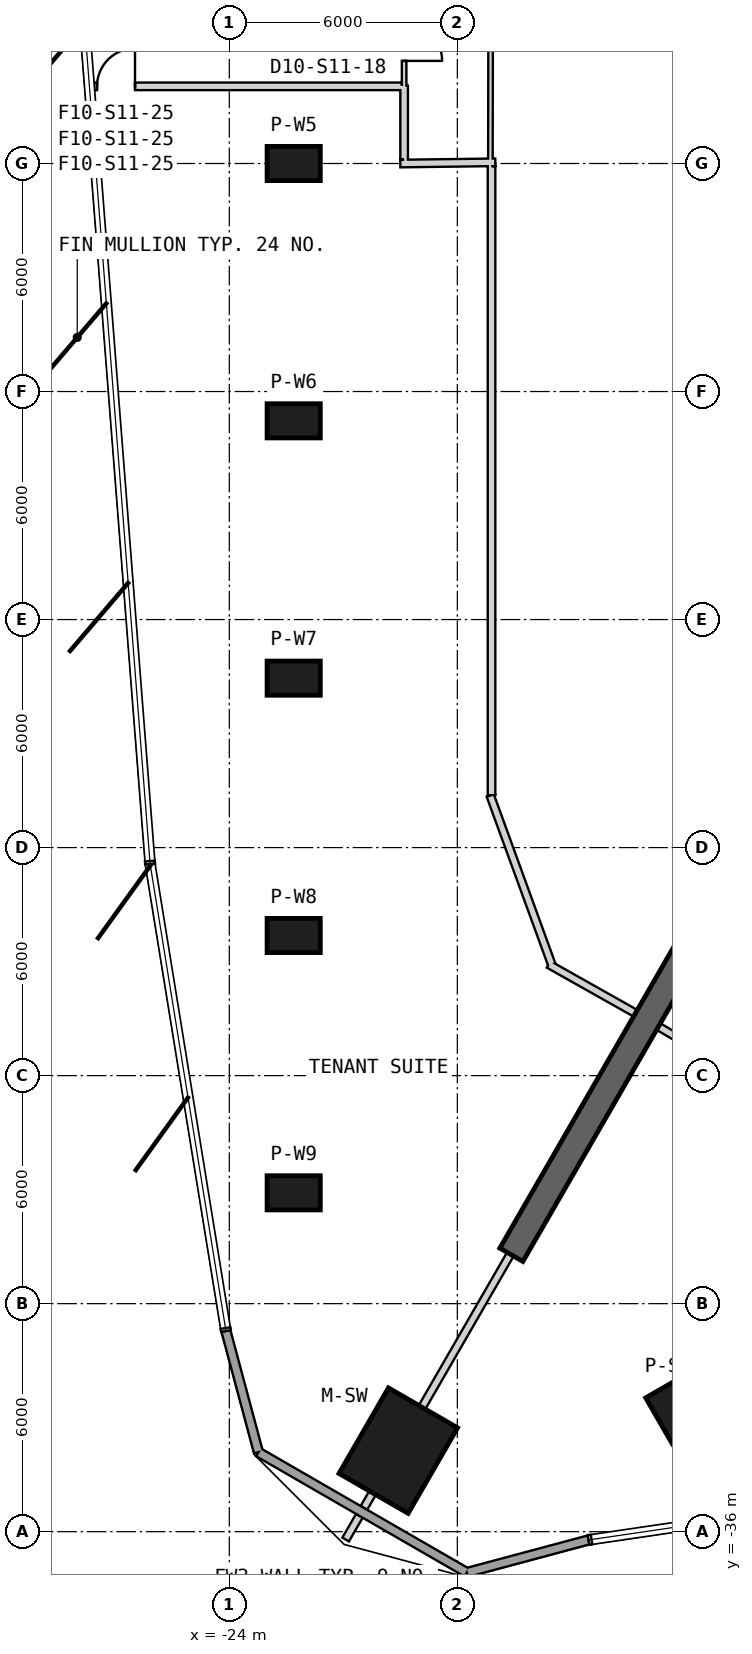
"""IFC4 building model, lengths in metres.
Left out: names, types, materials, properties, quantities, classifications, styles, units other than length and angle.
Written with IfcOpenShell. Run it as: python <this file> out.ifc"""

import sys

from ifc_helpers import new_model, si_unit, direction, frame, frame_2d, origin, origin_2d, place, context, subcontext, project, spatial, rectangle, extrude, element, fill, save


model = new_model("IFC4")
c1 = context("Model", 3, precision=1e-05, world=origin(), true_north=direction((0.0, 1.0)))
c2 = subcontext(c1, "Body", "Model", "MODEL_VIEW")
j1 = project(units=[si_unit("LENGTHUNIT", "METRE"), si_unit("PLANEANGLEUNIT", "RADIAN")], contexts=[c1])
p1 = place(None, origin())
s1 = spatial("IfcSite", under=j1, at=p1, CompositionType="ELEMENT")
p2 = place(p1, origin())
s2 = spatial("IfcBuilding", under=s1, at=p2, CompositionType="ELEMENT")
p3 = place(p2, frame((0.0, 0.0, 193.2)))
s3 = spatial("IfcBuildingStorey", under=s2, at=p3, CompositionType="ELEMENT", Elevation=193.2)
p4 = place(p3, frame((-19.553, -33.867, 0.0), z_axis=(0.0, 0.0, 1.0), x_axis=(-0.5, -0.866025403784, 0.0)))
e1 = element("IfcColumn", 1, at=p4, inside=s3, PredefinedType="COLUMN", context=c2, shape_type="SweptSolid", body=[
    extrude(rectangle(XDim=2.6, YDim=2.1, at=origin_2d()), origin(), (0.0, 0.0, 1.0), 4.0),
])
for number, where, z_axis, x_axis in (
    (2, (-22.306, 0.0, 0.0), (0.0, 0.0, 1.0), (-1.0, 0.0, 0.0)),
    (3, (-22.306, -6.771, 0.0), (0.0, 0.0, 1.0), (-1.0, 0.0, 0.0)),
    (4, (-22.306, -13.542, 0.0), (0.0, 0.0, 1.0), (-1.0, 0.0, 0.0)),
    (5, (-22.306, -20.313, 0.0), (0.0, 0.0, 1.0), (-1.0, 0.0, 0.0)),
    (6, (-22.306, -27.084, 0.0), (0.0, 0.0, 1.0), (-1.0, 0.0, 0.0)),
    (7, (-12.302, -32.859, 0.0), (0.0, 0.0, 1.0), (0.5, -0.866, 0.0)),
):
    element("IfcColumn", number, at=place(p3, frame(where, z_axis=z_axis, x_axis=x_axis)), inside=s3, PredefinedType="COLUMN", context=c2, shape_type="SweptSolid", body=[
        extrude(rectangle(XDim=1.4, YDim=0.9, at=origin_2d()), origin(), (0.0, 0.0, 1.0), 4.0),
    ])
p5 = place(p3, frame((-10.575, -18.316, 0.0), z_axis=(0.0, 0.0, 1.0), x_axis=(-0.500001138955, -0.866024746207, 0.0)))
e8 = element("IfcWall", 8, at=p5, inside=s3, PredefinedType="SHEAR", context=c2, shape_type="SweptSolid", body=[
    extrude(rectangle(XDim=12.007, YDim=0.7, at=frame_2d((6.003, 0.0))), origin(), (0.0, 0.0, 1.0), 4.0),
])
p6 = place(p3, frame((-24.088, -30.72, 0.0), z_axis=(0.0, 0.0, 1.0), x_axis=(0.258830906222, -0.965922648034, 0.0)))
e9 = element("IfcWall", 9, at=p6, inside=s3, PredefinedType="SOLIDWALL", context=c2, shape_type="SweptSolid", body=[
    extrude(rectangle(XDim=3.303, YDim=0.24, at=frame_2d((1.652, 0.0))), origin(), (0.0, 0.0, 1.0), 3.7),
])
p7 = place(p3, frame((-23.233, -33.911, 0.0), z_axis=(0.0, 0.0, 1.0), x_axis=(0.86602503047, -0.5000006466, 0.0)))
e10 = element("IfcWall", 10, at=p7, inside=s3, PredefinedType="SOLIDWALL", context=c2, shape_type="SweptSolid", body=[
    extrude(rectangle(XDim=6.331, YDim=0.24, at=frame_2d((3.165, 0.0))), origin(), (0.0, 0.0, 1.0), 3.7),
])
p8 = place(p3, frame((-17.751, -37.076, 0.0), z_axis=(0.0, 0.0, 1.0), x_axis=(0.965916501562, 0.258853842949, 0.0)))
e11 = element("IfcWall", 11, at=p8, inside=s3, PredefinedType="SOLIDWALL", context=c2, shape_type="SweptSolid", body=[
    extrude(rectangle(XDim=3.316, YDim=0.24, at=frame_2d((1.658, 0.0))), origin(), (0.0, 0.0, 1.0), 3.7),
])
p9 = place(p3, frame((-17.13, 0.0, 0.0), z_axis=(0.0, 0.0, 1.0), x_axis=(0.001787542932, 0.999998402344, 0.0)))
e12 = element("IfcWall", 12, at=p9, inside=s3, PredefinedType="PARTITIONING", context=c2, shape_type="SweptSolid", body=[
    extrude(rectangle(XDim=16.663, YDim=0.12, at=frame_2d((8.331, 0.0))), origin(), (0.0, 0.0, 1.0), 2.88),
])
p10 = place(p9, frame((7.831, 0.0, 0.0)))
e13 = element("IfcOpeningElement", 13, at=p10, cuts=e12, PredefinedType="OPENING", context=c2, shape_type="SweptSolid", body=[
    extrude(rectangle(XDim=1.0, YDim=2.1, at=frame_2d((0.5, 1.05))), frame((0.0, 0.07, 0.0), z_axis=(0.0, -1.0, 0.0), x_axis=(1.0, 0.0, 0.0)), (0.0, 0.0, 1.0), 0.14),
])
p11 = place(p3, frame((-19.4, 4.35, 0.0), z_axis=(0.0, 0.0, 1.0), x_axis=(0.0, -1.0, 0.0)))
e14 = element("IfcWall", 14, at=p11, inside=s3, PredefinedType="PARTITIONING", context=c2, shape_type="SweptSolid", body=[
    extrude(rectangle(XDim=2.3, YDim=0.12, at=frame_2d((1.15, 0.0))), origin(), (0.0, 0.0, 1.0), 3.7),
])
p12 = place(p11, frame((0.65, 0.0, 0.0)))
e15 = element("IfcOpeningElement", 15, at=p12, cuts=e14, PredefinedType="OPENING", context=c2, shape_type="SweptSolid", body=[
    extrude(rectangle(XDim=1.0, YDim=2.1, at=frame_2d((0.5, 1.05))), frame((0.0, 0.07, 0.0), z_axis=(0.0, -1.0, 0.0), x_axis=(1.0, 0.0, 0.0)), (0.0, 0.0, 1.0), 0.14),
])
p13 = place(p3, frame((-19.5, -0.001, 0.0), z_axis=(0.0, 0.0, 1.0), x_axis=(0.999915662945, 0.012987185857, 0.0)))
e16 = element("IfcWall", 16, at=p13, inside=s3, PredefinedType="PARTITIONING", context=c2, shape_type="SweptSolid", body=[
    extrude(rectangle(XDim=2.5, YDim=0.2, at=frame_2d((1.25, 0.0))), origin(), (0.0, 0.0, 1.0), 3.07),
])
p14 = place(p3, frame((-19.4, 2.05, 0.0), z_axis=(0.0, 0.0, 1.0), x_axis=(0.0, -1.0, 0.0)))
e17 = element("IfcWall", 17, at=p14, inside=s3, PredefinedType="PARTITIONING", context=c2, shape_type="SweptSolid", body=[
    extrude(rectangle(XDim=1.95, YDim=0.2, at=frame_2d((0.975, 0.0))), origin(), (0.0, 0.0, 1.0), 3.07),
])
p15 = place(p3, frame((-15.598, -21.072, 0.0), z_axis=(0.0, 0.0, 1.0), x_axis=(0.871234731294, -0.490866624438, 0.0)))
e18 = element("IfcWall", 18, at=p15, inside=s3, PredefinedType="PARTITIONING", context=c2, shape_type="SweptSolid", body=[
    extrude(rectangle(XDim=2.623, YDim=0.2, at=frame_2d((1.311, 0.0))), origin(), (0.0, 0.0, 1.0), 3.7),
])
p16 = place(p3, frame((-17.134, -16.629, 0.0), z_axis=(0.0, 0.0, 1.0), x_axis=(0.342036655594, -0.939686610647, 0.0)))
e19 = element("IfcWall", 19, at=p16, inside=s3, PredefinedType="PARTITIONING", context=c2, shape_type="SweptSolid", body=[
    extrude(rectangle(XDim=4.74, YDim=0.2, at=frame_2d((2.37, 0.0))), origin(), (0.0, 0.0, 1.0), 2.78),
])
p17 = place(p3, frame((-17.1, -0.07, 0.0), z_axis=(0.0, 0.0, 1.0), x_axis=(0.0, -1.0, 0.0)))
e20 = element("IfcWall", 20, at=p17, inside=s3, PredefinedType="PARTITIONING", context=c2, shape_type="SweptSolid", body=[
    extrude(rectangle(XDim=16.552, YDim=0.2, at=frame_2d((8.276, 0.0))), origin(), (0.0, 0.0, 1.0), 2.88),
])
p18 = place(p3, frame((-12.707, -22.709, 0.0), z_axis=(0.0, 0.0, 1.0), x_axis=(0.860754387085, -0.509020515415, 0.0)))
e21 = element("IfcWall", 21, at=p18, inside=s3, PredefinedType="PARTITIONING", context=c2, shape_type="SweptSolid", body=[
    extrude(rectangle(XDim=2.457, YDim=0.2, at=frame_2d((1.229, 0.0))), origin(), (0.0, 0.0, 1.0), 3.7),
])
p19 = place(p3, frame((-27.681, 2.03, 0.0), z_axis=(0.0, 0.0, 1.0), x_axis=(0.999999999559, 2.969562e-05, 0.0)))
e22 = element("IfcWall", 22, at=p19, inside=s3, PredefinedType="PARTITIONING", context=c2, shape_type="SweptSolid", body=[
    extrude(rectangle(XDim=8.221, YDim=0.2, at=frame_2d((4.111, 0.0))), origin(), (0.0, 0.0, 1.0), 3.7),
])
p20 = place(p19, frame((0.2, 0.0, 0.0)))
e23 = element("IfcOpeningElement", 23, at=p20, cuts=e22, PredefinedType="OPENING", context=c2, shape_type="SweptSolid", body=[
    extrude(rectangle(XDim=1.0, YDim=2.1, at=frame_2d((0.5, 1.05))), frame((0.0, 0.11, 0.0), z_axis=(0.0, -1.0, 0.0), x_axis=(1.0, 0.0, 0.0)), (0.0, 0.0, 1.0), 0.22),
])
p21 = place(p3, frame((-20.938, -36.206, 0.0), z_axis=(0.0, 0.0, 1.0), x_axis=(0.49996696679, 0.866044474677, 0.0)))
e24 = element("IfcWall", 24, at=p21, inside=s3, PredefinedType="PARTITIONING", context=c2, shape_type="SweptSolid", body=[
    extrude(rectangle(XDim=0.72, YDim=0.2, at=frame_2d((0.36, 0.0))), origin(), (0.0, 0.0, 1.0), 3.7),
])
p22 = place(p3, frame((-20.458, -35.375, 0.0), z_axis=(0.0, 0.0, 1.0), x_axis=(0.500384246316, 0.865803445384, 0.0)))
e25 = element("IfcWall", 25, at=p22, inside=s3, PredefinedType="PARTITIONING", context=c2, shape_type="SweptSolid", body=[
    extrude(rectangle(XDim=0.458, YDim=0.2, at=frame_2d((0.229, 0.0))), origin(), (0.0, 0.0, 1.0), 3.7),
])
p23 = place(p3, frame((-18.929, -32.727, 0.0), z_axis=(0.0, 0.0, 1.0), x_axis=(0.500007271693, 0.86602120543, 0.0)))
e26 = element("IfcWall", 26, at=p23, inside=s3, PredefinedType="PARTITIONING", context=c2, shape_type="SweptSolid", body=[
    extrude(rectangle(XDim=4.65, YDim=0.2, at=frame_2d((2.325, 0.0))), origin(), (0.0, 0.0, 1.0), 3.27),
])
p24 = place(p12, origin())
e27 = element("IfcDoor", 27, at=p24, inside=s3, OperationType="SINGLE_SWING_RIGHT", PredefinedType="NOTDEFINED", context=c2, shape_type="SweptSolid", body=[
    extrude(rectangle(XDim=1.0, YDim=2.1, at=frame_2d((0.5, 1.05))), frame((0.0, 0.025, 0.0), z_axis=(0.0, -1.0, 0.0), x_axis=(1.0, 0.0, 0.0)), (0.0, 0.0, 1.0), 0.05),
])
fill(e15, e27)
p25 = place(p20, origin())
e28 = element("IfcDoor", 28, at=p25, inside=s3, OperationType="SINGLE_SWING_LEFT", PredefinedType="USERDEFINED", context=c2, shape_type="SweptSolid", body=[
    extrude(rectangle(XDim=1.0, YDim=2.1, at=frame_2d((0.5, 1.05))), frame((0.0, 0.025, 0.0), z_axis=(0.0, -1.0, 0.0), x_axis=(1.0, 0.0, 0.0)), (0.0, 0.0, 1.0), 0.05),
])
fill(e23, e28)
save(model, sys.argv[1])
